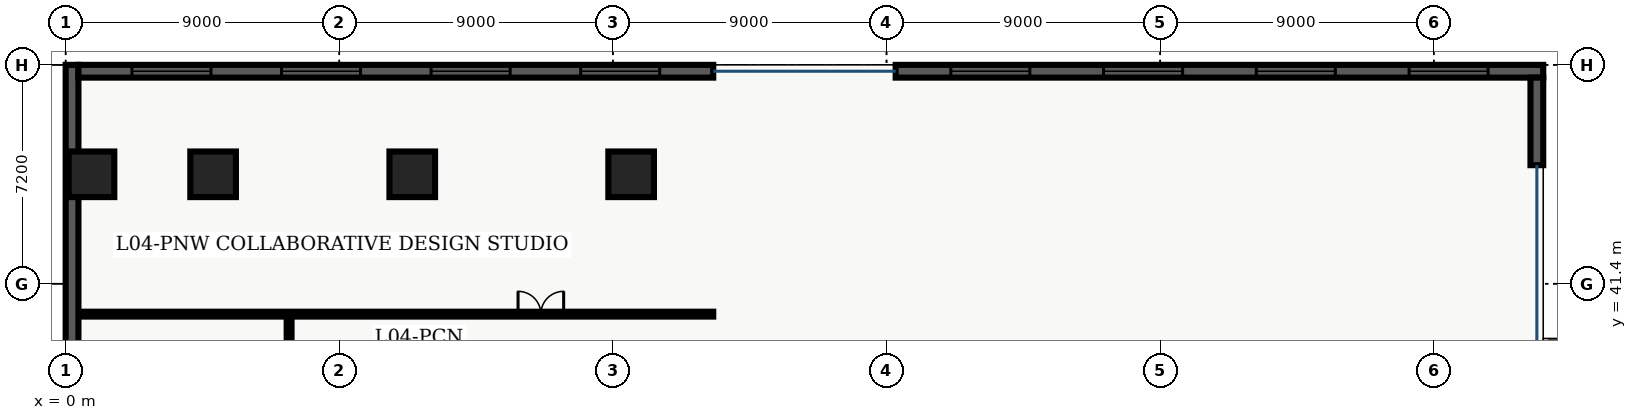
"""IFC4 building model, lengths in metres.
Left out: names, types, materials, properties, quantities, classifications, styles, units other than length and angle.
Written with IfcOpenShell. Run it as: python <this file> out.ifc"""

import sys

from ifc_helpers import new_model, entity, si_unit, converted_unit, direction, frame, origin_with_axes, origin_2d_with_axis, place, context, subcontext, project, spatial, polyline, rectangle, outline, extrude, element, fill, save


model = new_model("IFC4")
c1 = context("Model", 3, precision=1e-05, world=origin_with_axes(), true_north=direction((0.0, 1.0)))
c2 = subcontext(c1, "Body", "Model", "MODEL_VIEW")
j1 = project(units=[si_unit("LENGTHUNIT", "METRE"), converted_unit("PLANEANGLEUNIT", "DEGREE", entity("IfcPlaneAngleMeasure", 0.017), si_unit("PLANEANGLEUNIT", "RADIAN"), dimensions=[0, 0, 0, 0, 0, 0, 0])], contexts=[c1])
p1 = place(None, origin_with_axes())
s1 = spatial("IfcSite", under=j1, at=p1, CompositionType="ELEMENT")
p2 = place(p1, origin_with_axes())
s2 = spatial("IfcBuilding", under=s1, at=p2, CompositionType="ELEMENT")
p3 = place(p2, frame((0.0, 0.0, 19.8), z_axis=(0.0, 0.0, 1.0), x_axis=(1.0, 0.0, 0.0)))
s3 = spatial("IfcBuildingStorey", under=s2, at=p3, CompositionType="ELEMENT", Elevation=19.8)
for number, where, z_axis, x_axis in (
    (1, (11.4, 45.0, 0.0), (0.0, 0.0, 1.0), (1.0, 0.0, 0.0)),
    (2, (18.6, 45.0, 0.0), (0.0, 0.0, 1.0), (1.0, 0.0, 0.0)),
    (3, (4.85, 45.0, 0.0), (0.0, 0.0, 1.0), (1.0, 0.0, 0.0)),
    (4, (0.85, 45.0, 0.0), (0.0, 0.0, 1.0), (1.0, 0.0, 0.0)),
):
    element("IfcColumn", number, at=place(p3, frame(where, z_axis=z_axis, x_axis=x_axis)), inside=s3, PredefinedType="COLUMN", context=c2, shape_type="SweptSolid", body=[
        extrude(rectangle(XDim=1.5, YDim=1.5, at=origin_2d_with_axis()), origin_with_axes(), (0.0, 0.0, 1.0), 4.5),
    ])
p4 = place(p3, frame((0.38, 40.4, 0.0), z_axis=(0.0, 0.0, 1.0), x_axis=(1.0, 0.0, 0.0)))
e5 = element("IfcWall", 5, at=p4, inside=s3, PredefinedType="PARTITIONING", context=c2, shape_type="SweptSolid", body=[
    extrude(outline(polyline([(0.0, -0.08), (20.92, -0.08), (20.92, 0.08), (0.0, 0.08), (0.0, -0.08)])), origin_with_axes(), (0.0, 0.0, 1.0), 3.2),
])
p5 = place(p4, frame((15.25, 0.0, 0.0), z_axis=(0.0, 0.0, 1.0), x_axis=(1.0, 0.0, 0.0)))
e6 = element("IfcOpeningElement", 6, at=p5, cuts=e5, PredefinedType="OPENING", context=c2, shape_type="SweptSolid", body=[
    extrude(rectangle(XDim=1.5, YDim=0.18, at=origin_2d_with_axis()), origin_with_axes(), (0.0, 0.0, 1.0), 2.2),
])
p6 = place(p3, frame((7.35, 7.8, 0.0), z_axis=(0.0, 0.0, 1.0), x_axis=(0.0, 1.0, 0.0)))
e7 = element("IfcWall", 7, at=p6, inside=s3, PredefinedType="PARTITIONING", context=c2, shape_type="SweptSolid", body=[
    extrude(outline(polyline([(0.0, -0.08), (32.6, -0.08), (32.6, 0.08), (0.0, 0.08), (0.0, -0.08)])), origin_with_axes(), (0.0, 0.0, 1.0), 3.2),
])
p7 = place(p6, frame((8.25, 0.0, 0.0), z_axis=(0.0, 0.0, 1.0), x_axis=(1.0, 0.0, 0.0)))
e8 = element("IfcOpeningElement", 8, at=p7, cuts=e7, PredefinedType="OPENING", context=c2, shape_type="SweptSolid", body=[
    extrude(rectangle(XDim=1.5, YDim=0.18, at=origin_2d_with_axis()), origin_with_axes(), (0.0, 0.0, 1.0), 2.2),
])
p8 = place(p6, frame((21.5, 0.0, 0.0), z_axis=(0.0, 0.0, 1.0), x_axis=(1.0, 0.0, 0.0)))
e9 = element("IfcOpeningElement", 9, at=p8, cuts=e7, PredefinedType="OPENING", context=c2, shape_type="SweptSolid", body=[
    extrude(rectangle(XDim=1.0, YDim=0.18, at=origin_2d_with_axis()), origin_with_axes(), (0.0, 0.0, 1.0), 2.15),
])
p9 = place(p3, frame((0.21, 0.42, 0.0), z_axis=(0.0, 0.0, 1.0), x_axis=(0.0, 1.0, 0.0)))
e10 = element("IfcWall", 10, at=p9, inside=s3, PredefinedType="SOLIDWALL", context=c2, shape_type="SweptSolid", body=[
    extrude(outline(polyline([(0.0, -0.21), (48.18, -0.21), (48.18, 0.21), (0.0, 0.21), (0.0, -0.21)])), origin_with_axes(), (0.0, 0.0, 1.0), 4.26),
])
p10 = place(p9, frame((13.65, 0.0, 0.45), z_axis=(0.0, 0.0, 1.0), x_axis=(1.0, 0.0, 0.0)))
e11 = element("IfcOpeningElement", 11, at=p10, cuts=e10, PredefinedType="OPENING", context=c2, shape_type="SweptSolid", body=[
    extrude(rectangle(XDim=2.6, YDim=0.44, at=origin_2d_with_axis()), origin_with_axes(), (0.0, 0.0, 1.0), 2.8),
])
p11 = place(p9, frame((24.09, 0.0, 0.45), z_axis=(0.0, 0.0, 1.0), x_axis=(1.0, 0.0, 0.0)))
e12 = element("IfcOpeningElement", 12, at=p11, cuts=e10, PredefinedType="OPENING", context=c2, shape_type="SweptSolid", body=[
    extrude(rectangle(XDim=2.6, YDim=0.44, at=origin_2d_with_axis()), origin_with_axes(), (0.0, 0.0, 1.0), 2.8),
])
p12 = place(p9, frame((28.46, 0.0, 0.45), z_axis=(0.0, 0.0, 1.0), x_axis=(1.0, 0.0, 0.0)))
e13 = element("IfcOpeningElement", 13, at=p12, cuts=e10, PredefinedType="OPENING", context=c2, shape_type="SweptSolid", body=[
    extrude(rectangle(XDim=2.6, YDim=0.44, at=origin_2d_with_axis()), origin_with_axes(), (0.0, 0.0, 1.0), 2.8),
])
p13 = place(p9, frame((34.53, 0.0, 0.45), z_axis=(0.0, 0.0, 1.0), x_axis=(1.0, 0.0, 0.0)))
e14 = element("IfcOpeningElement", 14, at=p13, cuts=e10, PredefinedType="OPENING", context=c2, shape_type="SweptSolid", body=[
    extrude(rectangle(XDim=2.6, YDim=0.44, at=origin_2d_with_axis()), origin_with_axes(), (0.0, 0.0, 1.0), 2.8),
])
p14 = place(p3, frame((0.42, 48.39, 0.0), z_axis=(0.0, 0.0, 1.0), x_axis=(1.0, 0.0, 0.0)))
e15 = element("IfcWall", 15, at=p14, inside=s3, PredefinedType="SOLIDWALL", context=c2, shape_type="SweptSolid", body=[
    extrude(outline(polyline([(0.0, -0.21), (20.88, -0.21), (20.88, 0.21), (0.0, 0.21), (0.0, -0.21)])), origin_with_axes(), (0.0, 0.0, 1.0), 4.26),
])
p15 = place(p14, frame((3.06, 0.0, 0.45), z_axis=(0.0, 0.0, 1.0), x_axis=(1.0, 0.0, 0.0)))
e16 = element("IfcOpeningElement", 16, at=p15, cuts=e15, PredefinedType="OPENING", context=c2, shape_type="SweptSolid", body=[
    extrude(rectangle(XDim=2.6, YDim=0.44, at=origin_2d_with_axis()), origin_with_axes(), (0.0, 0.0, 1.0), 2.8),
])
p16 = place(p14, frame((7.98, 0.0, 0.45), z_axis=(0.0, 0.0, 1.0), x_axis=(1.0, 0.0, 0.0)))
e17 = element("IfcOpeningElement", 17, at=p16, cuts=e15, PredefinedType="OPENING", context=c2, shape_type="SweptSolid", body=[
    extrude(rectangle(XDim=2.6, YDim=0.44, at=origin_2d_with_axis()), origin_with_axes(), (0.0, 0.0, 1.0), 2.8),
])
p17 = place(p14, frame((12.9, 0.0, 0.45), z_axis=(0.0, 0.0, 1.0), x_axis=(1.0, 0.0, 0.0)))
e18 = element("IfcOpeningElement", 18, at=p17, cuts=e15, PredefinedType="OPENING", context=c2, shape_type="SweptSolid", body=[
    extrude(rectangle(XDim=2.6, YDim=0.44, at=origin_2d_with_axis()), origin_with_axes(), (0.0, 0.0, 1.0), 2.8),
])
p18 = place(p14, frame((17.82, 0.0, 0.45), z_axis=(0.0, 0.0, 1.0), x_axis=(1.0, 0.0, 0.0)))
e19 = element("IfcOpeningElement", 19, at=p18, cuts=e15, PredefinedType="OPENING", context=c2, shape_type="SweptSolid", body=[
    extrude(rectangle(XDim=2.6, YDim=0.44, at=origin_2d_with_axis()), origin_with_axes(), (0.0, 0.0, 1.0), 2.8),
])
p19 = place(p3, frame((27.3, 48.39, 0.0), z_axis=(0.0, 0.0, 1.0), x_axis=(1.0, 0.0, 0.0)))
e20 = element("IfcWall", 20, at=p19, inside=s3, PredefinedType="SOLIDWALL", context=c2, shape_type="SweptSolid", body=[
    extrude(outline(polyline([(0.0, -0.21), (21.3, -0.21), (21.3, 0.21), (0.0, 0.21), (0.0, -0.21)])), origin_with_axes(), (0.0, 0.0, 1.0), 4.26),
])
p20 = place(p19, frame((3.113, 0.0, 0.45), z_axis=(0.0, 0.0, 1.0), x_axis=(1.0, 0.0, 0.0)))
e21 = element("IfcOpeningElement", 21, at=p20, cuts=e20, PredefinedType="OPENING", context=c2, shape_type="SweptSolid", body=[
    extrude(rectangle(XDim=2.6, YDim=0.44, at=origin_2d_with_axis()), origin_with_axes(), (0.0, 0.0, 1.0), 2.8),
])
p21 = place(p19, frame((8.138, 0.0, 0.45), z_axis=(0.0, 0.0, 1.0), x_axis=(1.0, 0.0, 0.0)))
e22 = element("IfcOpeningElement", 22, at=p21, cuts=e20, PredefinedType="OPENING", context=c2, shape_type="SweptSolid", body=[
    extrude(rectangle(XDim=2.6, YDim=0.44, at=origin_2d_with_axis()), origin_with_axes(), (0.0, 0.0, 1.0), 2.8),
])
p22 = place(p19, frame((13.162, 0.0, 0.45), z_axis=(0.0, 0.0, 1.0), x_axis=(1.0, 0.0, 0.0)))
e23 = element("IfcOpeningElement", 23, at=p22, cuts=e20, PredefinedType="OPENING", context=c2, shape_type="SweptSolid", body=[
    extrude(rectangle(XDim=2.6, YDim=0.44, at=origin_2d_with_axis()), origin_with_axes(), (0.0, 0.0, 1.0), 2.8),
])
p23 = place(p19, frame((18.188, 0.0, 0.45), z_axis=(0.0, 0.0, 1.0), x_axis=(1.0, 0.0, 0.0)))
e24 = element("IfcOpeningElement", 24, at=p23, cuts=e20, PredefinedType="OPENING", context=c2, shape_type="SweptSolid", body=[
    extrude(rectangle(XDim=2.6, YDim=0.44, at=origin_2d_with_axis()), origin_with_axes(), (0.0, 0.0, 1.0), 2.8),
])
p24 = place(p3, frame((48.39, 48.18, 0.0), z_axis=(0.0, 0.0, 1.0), x_axis=(0.0, -1.0, 0.0)))
e25 = element("IfcWall", 25, at=p24, inside=s3, PredefinedType="SOLIDWALL", context=c2, shape_type="SweptSolid", body=[
    extrude(outline(polyline([(0.0, -0.21), (2.88, -0.21), (2.88, 0.21), (0.0, 0.21), (0.0, -0.21)])), origin_with_axes(), (0.0, 0.0, 1.0), 4.26),
])
p25 = place(p4, frame((15.25, 0.0, 0.0), z_axis=(0.0, 0.0, 1.0), x_axis=(1.0, 0.0, 0.0)))
e26 = element("IfcDoor", 26, at=p25, inside=s3, OperationType="DOUBLE_DOOR_SINGLE_SWING", PredefinedType="DOOR", context=c2, shape_type="SweptSolid", body=[
    extrude(rectangle(XDim=1.5, YDim=0.09, at=origin_2d_with_axis()), origin_with_axes(), (0.0, 0.0, 1.0), 2.2),
])
fill(e6, e26)
p26 = place(p14, frame((3.06, 0.0, 0.45), z_axis=(0.0, 0.0, 1.0), x_axis=(1.0, 0.0, 0.0)))
e27 = element("IfcWindow", 27, at=p26, inside=s3, PredefinedType="WINDOW", context=c2, shape_type="SweptSolid", body=[
    extrude(rectangle(XDim=2.6, YDim=0.09, at=origin_2d_with_axis()), origin_with_axes(), (0.0, 0.0, 1.0), 2.8),
])
fill(e16, e27)
p27 = place(p14, frame((7.98, 0.0, 0.45), z_axis=(0.0, 0.0, 1.0), x_axis=(1.0, 0.0, 0.0)))
e28 = element("IfcWindow", 28, at=p27, inside=s3, PredefinedType="WINDOW", context=c2, shape_type="SweptSolid", body=[
    extrude(rectangle(XDim=2.6, YDim=0.09, at=origin_2d_with_axis()), origin_with_axes(), (0.0, 0.0, 1.0), 2.8),
])
fill(e17, e28)
p28 = place(p14, frame((12.9, 0.0, 0.45), z_axis=(0.0, 0.0, 1.0), x_axis=(1.0, 0.0, 0.0)))
e29 = element("IfcWindow", 29, at=p28, inside=s3, PredefinedType="WINDOW", context=c2, shape_type="SweptSolid", body=[
    extrude(rectangle(XDim=2.6, YDim=0.09, at=origin_2d_with_axis()), origin_with_axes(), (0.0, 0.0, 1.0), 2.8),
])
fill(e18, e29)
p29 = place(p14, frame((17.82, 0.0, 0.45), z_axis=(0.0, 0.0, 1.0), x_axis=(1.0, 0.0, 0.0)))
e30 = element("IfcWindow", 30, at=p29, inside=s3, PredefinedType="WINDOW", context=c2, shape_type="SweptSolid", body=[
    extrude(rectangle(XDim=2.6, YDim=0.09, at=origin_2d_with_axis()), origin_with_axes(), (0.0, 0.0, 1.0), 2.8),
])
fill(e19, e30)
p30 = place(p19, frame((3.113, 0.0, 0.45), z_axis=(0.0, 0.0, 1.0), x_axis=(1.0, 0.0, 0.0)))
e31 = element("IfcWindow", 31, at=p30, inside=s3, PredefinedType="WINDOW", context=c2, shape_type="SweptSolid", body=[
    extrude(rectangle(XDim=2.6, YDim=0.09, at=origin_2d_with_axis()), origin_with_axes(), (0.0, 0.0, 1.0), 2.8),
])
fill(e21, e31)
p31 = place(p19, frame((8.138, 0.0, 0.45), z_axis=(0.0, 0.0, 1.0), x_axis=(1.0, 0.0, 0.0)))
e32 = element("IfcWindow", 32, at=p31, inside=s3, PredefinedType="WINDOW", context=c2, shape_type="SweptSolid", body=[
    extrude(rectangle(XDim=2.6, YDim=0.09, at=origin_2d_with_axis()), origin_with_axes(), (0.0, 0.0, 1.0), 2.8),
])
fill(e22, e32)
p32 = place(p19, frame((13.162, 0.0, 0.45), z_axis=(0.0, 0.0, 1.0), x_axis=(1.0, 0.0, 0.0)))
e33 = element("IfcWindow", 33, at=p32, inside=s3, PredefinedType="WINDOW", context=c2, shape_type="SweptSolid", body=[
    extrude(rectangle(XDim=2.6, YDim=0.09, at=origin_2d_with_axis()), origin_with_axes(), (0.0, 0.0, 1.0), 2.8),
])
fill(e23, e33)
p33 = place(p19, frame((18.188, 0.0, 0.45), z_axis=(0.0, 0.0, 1.0), x_axis=(1.0, 0.0, 0.0)))
e34 = element("IfcWindow", 34, at=p33, inside=s3, PredefinedType="WINDOW", context=c2, shape_type="SweptSolid", body=[
    extrude(rectangle(XDim=2.6, YDim=0.09, at=origin_2d_with_axis()), origin_with_axes(), (0.0, 0.0, 1.0), 2.8),
])
fill(e24, e34)
save(model, sys.argv[1])
